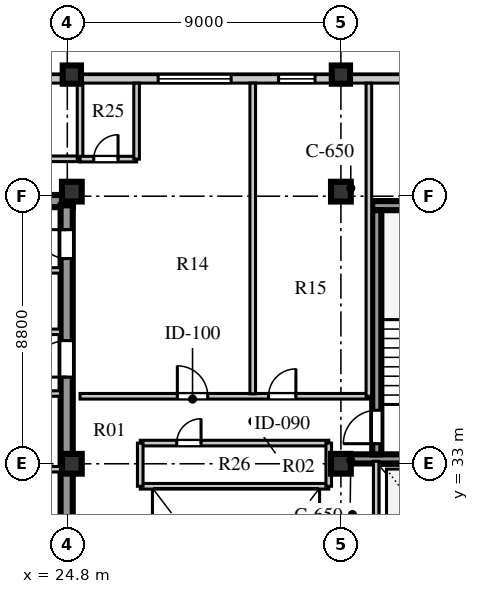
"""IFC4 building model, lengths in metres.
Left out: names, types, materials, properties, quantities, classifications, styles, units other than length and angle.
Written with IfcOpenShell. Run it as: python <this file> out.ifc"""

import sys

from ifc_helpers import new_model, si_unit, direction, frame, frame_2d, origin, origin_2d, place, context, subcontext, project, spatial, rectangle, extrude, element, fill, save


model = new_model("IFC4")
c1 = context("Model", 3, precision=1e-05, world=origin(), true_north=direction((0.0, 1.0)))
c2 = subcontext(c1, "Body", "Model", "MODEL_VIEW")
j1 = project(units=[si_unit("LENGTHUNIT", "METRE"), si_unit("PLANEANGLEUNIT", "RADIAN")], contexts=[c1])
p1 = place(None, origin())
s1 = spatial("IfcSite", under=j1, at=p1, CompositionType="ELEMENT")
p2 = place(p1, origin())
s2 = spatial("IfcBuilding", under=s1, at=p2, CompositionType="ELEMENT")
p3 = place(p2, frame((0.0, 0.0, 335.3)))
s3 = spatial("IfcBuildingStorey", under=s2, at=p3, CompositionType="ELEMENT", Elevation=335.3)
p4 = place(p3, frame((15.5, 41.64, 0.0), z_axis=(0.0, 0.0, 1.0), x_axis=(1.0, 0.0, 0.0)))
e1 = element("IfcWall", 1, at=p4, inside=s3, PredefinedType="SHEAR", context=c2, shape_type="SweptSolid", body=[
    extrude(rectangle(XDim=9.48, YDim=0.4, at=frame_2d((4.74, 0.0))), origin(), (0.0, 0.0, 1.0), 3.56),
])
p5 = place(p3, frame((24.78, 15.74, 0.0), z_axis=(0.0, 0.0, 1.0), x_axis=(0.0, 1.0, 0.0)))
e2 = element("IfcWall", 2, at=p5, inside=s3, PredefinedType="SHEAR", context=c2, shape_type="SweptSolid", body=[
    extrude(rectangle(XDim=25.76, YDim=0.4, at=frame_2d((12.88, 0.0))), origin(), (0.0, 0.0, 1.0), 3.56),
])
p6 = place(p5, frame((1.61, 0.0, 0.0)))
e3 = element("IfcOpeningElement", 3, at=p6, cuts=e2, PredefinedType="OPENING", context=c2, shape_type="SweptSolid", body=[
    extrude(rectangle(XDim=1.2, YDim=2.1, at=frame_2d((0.6, 1.05))), frame((0.0, 0.21, 0.0), z_axis=(0.0, -1.0, 0.0), x_axis=(1.0, 0.0, 0.0)), (0.0, 0.0, 1.0), 0.42),
])
p7 = place(p5, frame((6.78, 0.0, 0.0)))
e4 = element("IfcOpeningElement", 4, at=p7, cuts=e2, PredefinedType="OPENING", context=c2, shape_type="SweptSolid", body=[
    extrude(rectangle(XDim=0.85, YDim=2.06, at=frame_2d((0.425, 1.03))), frame((0.0, 0.21, 0.0), z_axis=(0.0, -1.0, 0.0), x_axis=(1.0, 0.0, 0.0)), (0.0, 0.0, 1.0), 0.42),
])
p8 = place(p5, frame((12.11, 0.0, 0.0)))
e5 = element("IfcOpeningElement", 5, at=p8, cuts=e2, PredefinedType="OPENING", context=c2, shape_type="SweptSolid", body=[
    extrude(rectangle(XDim=1.5, YDim=2.12, at=frame_2d((0.75, 1.06))), frame((0.0, 0.21, 0.0), z_axis=(0.0, -1.0, 0.0), x_axis=(1.0, 0.0, 0.0)), (0.0, 0.0, 1.0), 0.42),
])
p9 = place(p5, frame((20.11, 0.0, 0.0)))
e6 = element("IfcOpeningElement", 6, at=p9, cuts=e2, PredefinedType="OPENING", context=c2, shape_type="SweptSolid", body=[
    extrude(rectangle(XDim=1.2, YDim=2.12, at=frame_2d((0.6, 1.06))), frame((0.0, 0.21, 0.0), z_axis=(0.0, -1.0, 0.0), x_axis=(1.0, 0.0, 0.0)), (0.0, 0.0, 1.0), 0.42),
])
p10 = place(p5, frame((24.01, 0.0, 0.0)))
e7 = element("IfcOpeningElement", 7, at=p10, cuts=e2, PredefinedType="OPENING", context=c2, shape_type="SweptSolid", body=[
    extrude(rectangle(XDim=0.95, YDim=2.1, at=frame_2d((0.475, 1.05))), frame((0.0, 0.21, 0.0), z_axis=(0.0, -1.0, 0.0), x_axis=(1.0, 0.0, 0.0)), (0.0, 0.0, 1.0), 0.42),
])
p11 = place(p3, frame((34.125, 33.16, 0.0), z_axis=(0.0, 0.0, 1.0), x_axis=(1.0, 0.0, 0.0)))
e8 = element("IfcWall", 8, at=p11, inside=s3, PredefinedType="SHEAR", context=c2, shape_type="SweptSolid", body=[
    extrude(rectangle(XDim=4.745, YDim=0.3, at=frame_2d((2.373, 0.0))), origin(), (0.0, 0.0, 1.0), 3.56),
])
p12 = place(p3, frame((34.83, 41.49, 0.0), z_axis=(0.0, 0.0, 1.0), x_axis=(1.0, 0.0, 0.0)))
e9 = element("IfcWall", 9, at=p12, inside=s3, PredefinedType="SHEAR", context=c2, shape_type="SweptSolid", body=[
    extrude(rectangle(XDim=4.04, YDim=0.3, at=frame_2d((2.02, 0.0))), origin(), (0.0, 0.0, 1.0), 3.56),
])
p13 = place(p3, frame((34.98, 33.31, 0.0), z_axis=(0.0, 0.0, 1.0), x_axis=(0.0, 1.0, 0.0)))
e10 = element("IfcWall", 10, at=p13, inside=s3, PredefinedType="SHEAR", context=c2, shape_type="SweptSolid", body=[
    extrude(rectangle(XDim=8.03, YDim=0.3, at=frame_2d((4.015, 0.0))), origin(), (0.0, 0.0, 1.0), 3.56),
])
p14 = place(p13, frame((0.35, 0.0, 0.0)))
e11 = element("IfcOpeningElement", 11, at=p14, cuts=e10, PredefinedType="OPENING", context=c2, shape_type="SweptSolid", body=[
    extrude(rectangle(XDim=1.1, YDim=2.1, at=frame_2d((0.55, 1.05))), frame((0.0, 0.16, 0.0), z_axis=(0.0, -1.0, 0.0), x_axis=(1.0, 0.0, 0.0)), (0.0, 0.0, 1.0), 0.32),
])
for number, where, z_axis, x_axis in (
    (12, (24.95, 33.0, 0.0), (0.0, 0.0, 1.0), (1.0, 0.0, 0.0)),
    (13, (24.95, 41.95, 0.0), (0.0, 0.0, 1.0), (1.0, 0.0, 0.0)),
    (14, (33.8, 33.0, 0.0), (0.0, 0.0, 1.0), (1.0, 0.0, 0.0)),
    (15, (33.8, 41.95, 0.0), (0.0, 0.0, 1.0), (1.0, 0.0, 0.0)),
):
    element("IfcColumn", number, at=place(p3, frame(where, z_axis=z_axis, x_axis=x_axis)), inside=s3, PredefinedType="COLUMN", context=c2, shape_type="SweptSolid", body=[
        extrude(rectangle(XDim=0.65, YDim=0.65, at=origin_2d()), origin(), (0.0, 0.0, 1.0), 3.56),
    ])
for number, where, z_axis, x_axis in (
    (16, (24.95, 45.8, 0.0), (0.0, 0.0, 1.0), (1.0, 0.0, 0.0)),
    (17, (33.8, 45.8, 0.0), (0.0, 0.0, 1.0), (1.0, 0.0, 0.0)),
):
    element("IfcColumn", number, at=place(p3, frame(where, z_axis=z_axis, x_axis=x_axis)), inside=s3, PredefinedType="COLUMN", context=c2, shape_type="SweptSolid", body=[
        extrude(rectangle(XDim=0.6, YDim=0.6, at=origin_2d()), origin(), (0.0, 0.0, 1.0), 3.56),
    ])
p15 = place(p3, frame((39.8, 45.66, 0.0), z_axis=(0.0, 0.0, 1.0), x_axis=(-1.0, 0.0, 0.0)))
e18 = element("IfcWall", 18, at=p15, inside=s3, PredefinedType="STANDARD", context=c2, shape_type="SweptSolid", body=[
    extrude(rectangle(XDim=26.0, YDim=0.28, at=frame_2d((13.0, 0.0))), origin(), (0.0, 0.0, 1.0), 2.92),
])
p16 = place(p15, frame((19.0, 0.0, 0.8)))
e19 = element("IfcOpeningElement", 19, at=p16, cuts=e18, PredefinedType="OPENING", context=c2, shape_type="SweptSolid", body=[
    extrude(rectangle(XDim=1.2, YDim=1.75, at=frame_2d((0.6, 0.875))), frame((0.0, 0.15, 0.0), z_axis=(0.0, -1.0, 0.0), x_axis=(1.0, 0.0, 0.0)), (0.0, 0.0, 1.0), 0.3),
])
p17 = place(p15, frame((9.61, 0.0, 0.8)))
e20 = element("IfcOpeningElement", 20, at=p17, cuts=e18, PredefinedType="OPENING", context=c2, shape_type="SweptSolid", body=[
    extrude(rectangle(XDim=2.4, YDim=2.05, at=frame_2d((1.2, 1.025))), frame((0.0, 0.15, 0.0), z_axis=(0.0, -1.0, 0.0), x_axis=(1.0, 0.0, 0.0)), (0.0, 0.0, 1.0), 0.3),
])
p18 = place(p15, frame((6.85, 0.0, 0.8)))
e21 = element("IfcOpeningElement", 21, at=p18, cuts=e18, PredefinedType="OPENING", context=c2, shape_type="SweptSolid", body=[
    extrude(rectangle(XDim=1.2, YDim=1.75, at=frame_2d((0.6, 0.875))), frame((0.0, 0.15, 0.0), z_axis=(0.0, -1.0, 0.0), x_axis=(1.0, 0.0, 0.0)), (0.0, 0.0, 1.0), 0.3),
])
p19 = place(p15, frame((1.8, 0.0, 0.8)))
e22 = element("IfcOpeningElement", 22, at=p19, cuts=e18, PredefinedType="OPENING", context=c2, shape_type="SweptSolid", body=[
    extrude(rectangle(XDim=1.35, YDim=1.9, at=frame_2d((0.675, 0.95))), frame((0.0, 0.15, 0.0), z_axis=(0.0, -1.0, 0.0), x_axis=(1.0, 0.0, 0.0)), (0.0, 0.0, 1.0), 0.3),
])
p20 = place(p3, frame((15.9, 32.82, 0.0), z_axis=(0.0, 0.0, 1.0), x_axis=(1.0, 0.0, 0.0)))
e23 = element("IfcWall", 23, at=p20, inside=s3, PredefinedType="SOLIDWALL", context=c2, shape_type="SweptSolid", body=[
    extrude(rectangle(XDim=8.68, YDim=0.18, at=frame_2d((4.34, 0.0))), origin(), (0.0, 0.0, 1.0), 2.96),
])
p21 = place(p3, frame((22.02, 35.31, 0.0), z_axis=(0.0, 0.0, 1.0), x_axis=(1.0, 0.0, 0.0)))
e24 = element("IfcWall", 24, at=p21, inside=s3, PredefinedType="SOLIDWALL", context=c2, shape_type="SweptSolid", body=[
    extrude(rectangle(XDim=2.56, YDim=0.18, at=frame_2d((1.28, 0.0))), origin(), (0.0, 0.0, 1.0), 3.56),
])
p22 = place(p21, frame((0.55, 0.0, 0.0)))
e25 = element("IfcOpeningElement", 25, at=p22, cuts=e24, PredefinedType="OPENING", context=c2, shape_type="SweptSolid", body=[
    extrude(rectangle(XDim=1.0, YDim=2.1, at=frame_2d((0.5, 1.05))), frame((0.0, 0.1, 0.0), z_axis=(0.0, -1.0, 0.0), x_axis=(1.0, 0.0, 0.0)), (0.0, 0.0, 1.0), 0.2),
])
p23 = place(p3, frame((19.64, 37.34, 0.0), z_axis=(0.0, 0.0, 1.0), x_axis=(1.0, 0.0, 0.0)))
e26 = element("IfcWall", 26, at=p23, inside=s3, PredefinedType="SOLIDWALL", context=c2, shape_type="SweptSolid", body=[
    extrude(rectangle(XDim=4.94, YDim=0.18, at=frame_2d((2.47, 0.0))), origin(), (0.0, 0.0, 1.0), 3.56),
])
p24 = place(p23, frame((0.45, 0.0, 0.0)))
e27 = element("IfcOpeningElement", 27, at=p24, cuts=e26, PredefinedType="OPENING", context=c2, shape_type="SweptSolid", body=[
    extrude(rectangle(XDim=1.0, YDim=2.1, at=frame_2d((0.5, 1.05))), frame((0.0, 0.1, 0.0), z_axis=(0.0, -1.0, 0.0), x_axis=(1.0, 0.0, 0.0)), (0.0, 0.0, 1.0), 0.2),
])
p25 = place(p23, frame((2.5, 0.0, 0.0)))
e28 = element("IfcOpeningElement", 28, at=p25, cuts=e26, PredefinedType="OPENING", context=c2, shape_type="SweptSolid", body=[
    extrude(rectangle(XDim=1.0, YDim=2.1, at=frame_2d((0.5, 1.05))), frame((0.0, 0.1, 0.0), z_axis=(0.0, -1.0, 0.0), x_axis=(1.0, 0.0, 0.0)), (0.0, 0.0, 1.0), 0.2),
])
p26 = place(p3, frame((19.64, 39.36, 0.0), z_axis=(0.0, 0.0, 1.0), x_axis=(1.0, 0.0, 0.0)))
e29 = element("IfcWall", 29, at=p26, inside=s3, PredefinedType="SOLIDWALL", context=c2, shape_type="SweptSolid", body=[
    extrude(rectangle(XDim=4.94, YDim=0.18, at=frame_2d((2.47, 0.0))), origin(), (0.0, 0.0, 1.0), 3.56),
])
p27 = place(p3, frame((34.96, 28.86, 0.0), z_axis=(0.0, 0.0, 1.0), x_axis=(0.0, 1.0, 0.0)))
e30 = element("IfcWall", 30, at=p27, inside=s3, PredefinedType="SOLIDWALL", context=c2, shape_type="SweptSolid", body=[
    extrude(rectangle(XDim=4.22, YDim=0.18, at=frame_2d((2.11, 0.0))), origin(), (0.0, 0.0, 1.0), 3.56),
])
p28 = place(p3, frame((25.22, 35.22, 0.0), z_axis=(0.0, 0.0, 1.0), x_axis=(1.0, 0.0, 0.0)))
e31 = element("IfcWall", 31, at=p28, inside=s3, PredefinedType="SOLIDWALL", context=c2, shape_type="SweptSolid", body=[
    extrude(rectangle(XDim=9.5, YDim=0.185, at=frame_2d((4.75, 0.0))), origin(), (0.0, 0.0, 1.0), 3.56),
])
p29 = place(p28, frame((3.2, 0.0, 0.0)))
e32 = element("IfcOpeningElement", 32, at=p29, cuts=e31, PredefinedType="OPENING", context=c2, shape_type="SweptSolid", body=[
    extrude(rectangle(XDim=1.0, YDim=2.08, at=frame_2d((0.5, 1.04))), frame((0.0, 0.103, 0.0), z_axis=(0.0, -1.0, 0.0), x_axis=(1.0, 0.0, 0.0)), (0.0, 0.0, 1.0), 0.205),
])
p30 = place(p28, frame((6.2, 0.0, 0.0)))
e33 = element("IfcOpeningElement", 33, at=p30, cuts=e31, PredefinedType="OPENING", context=c2, shape_type="SweptSolid", body=[
    extrude(rectangle(XDim=0.9, YDim=2.08, at=frame_2d((0.45, 1.04))), frame((0.0, 0.103, 0.0), z_axis=(0.0, -1.0, 0.0), x_axis=(1.0, 0.0, 0.0)), (0.0, 0.0, 1.0), 0.205),
])
p31 = place(p3, frame((14.15, 43.03, 0.0), z_axis=(0.0, 0.0, 1.0), x_axis=(1.0, 0.0, 0.0)))
e34 = element("IfcWall", 34, at=p31, inside=s3, PredefinedType="SOLIDWALL", context=c2, shape_type="SweptSolid", body=[
    extrude(rectangle(XDim=11.07, YDim=0.185, at=frame_2d((5.535, 0.0))), origin(), (0.0, 0.0, 1.0), 3.56),
])
p32 = place(p31, frame((3.2, 0.0, 0.0)))
e35 = element("IfcOpeningElement", 35, at=p32, cuts=e34, PredefinedType="OPENING", context=c2, shape_type="SweptSolid", body=[
    extrude(rectangle(XDim=0.95, YDim=2.08, at=frame_2d((0.475, 1.04))), frame((0.0, 0.103, 0.0), z_axis=(0.0, -1.0, 0.0), x_axis=(1.0, 0.0, 0.0)), (0.0, 0.0, 1.0), 0.205),
])
p33 = place(p3, frame((25.22, 43.03, 0.0), z_axis=(0.0, 0.0, 1.0), x_axis=(0.0, 1.0, 0.0)))
e36 = element("IfcWall", 36, at=p33, inside=s3, PredefinedType="SOLIDWALL", context=c2, shape_type="SweptSolid", body=[
    extrude(rectangle(XDim=2.49, YDim=0.185, at=frame_2d((1.245, 0.0))), origin(), (0.0, 0.0, 1.0), 3.11),
])
p34 = place(p3, frame((34.72, 35.22, 0.0), z_axis=(0.0, 0.0, 1.0), x_axis=(0.0, 1.0, 0.0)))
e37 = element("IfcWall", 37, at=p34, inside=s3, PredefinedType="SOLIDWALL", context=c2, shape_type="SweptSolid", body=[
    extrude(rectangle(XDim=10.3, YDim=0.185, at=frame_2d((5.15, 0.0))), origin(), (0.0, 0.0, 1.0), 3.56),
])
p35 = place(p3, frame((30.9, 35.3, 0.0), z_axis=(0.0, 0.0, 1.0), x_axis=(0.0, 1.0, 0.0)))
e38 = element("IfcWall", 38, at=p35, inside=s3, PredefinedType="SOLIDWALL", context=c2, shape_type="SweptSolid", body=[
    extrude(rectangle(XDim=10.22, YDim=0.185, at=frame_2d((5.11, 0.0))), origin(), (0.0, 0.0, 1.0), 3.56),
])
p36 = place(p3, frame((25.22, 43.02, 0.0), z_axis=(0.0, 0.0, 1.0), x_axis=(1.0, 0.0, 0.0)))
e39 = element("IfcWall", 39, at=p36, inside=s3, PredefinedType="SOLIDWALL", context=c2, shape_type="SweptSolid", body=[
    extrude(rectangle(XDim=1.86, YDim=0.185, at=frame_2d((0.93, 0.0))), origin(), (0.0, 0.0, 1.0), 3.56),
])
p37 = place(p36, frame((0.45, 0.0, 0.0)))
e40 = element("IfcOpeningElement", 40, at=p37, cuts=e39, PredefinedType="OPENING", context=c2, shape_type="SweptSolid", body=[
    extrude(rectangle(XDim=0.8, YDim=2.05, at=frame_2d((0.4, 1.025))), frame((0.0, 0.103, 0.0), z_axis=(0.0, -1.0, 0.0), x_axis=(1.0, 0.0, 0.0)), (0.0, 0.0, 1.0), 0.205),
])
p38 = place(p3, frame((27.08, 43.02, 0.0), z_axis=(0.0, 0.0, 1.0), x_axis=(0.0, 1.0, 0.0)))
e41 = element("IfcWall", 41, at=p38, inside=s3, PredefinedType="SOLIDWALL", context=c2, shape_type="SweptSolid", body=[
    extrude(rectangle(XDim=2.5, YDim=0.185, at=frame_2d((1.25, 0.0))), origin(), (0.0, 0.0, 1.0), 3.56),
])
p39 = place(p3, frame((27.2, 33.68, 0.0), z_axis=(0.0, 0.0, 1.0), x_axis=(1.0, 0.0, 0.0)))
e42 = element("IfcWall", 42, at=p39, inside=s3, PredefinedType="SOLIDWALL", context=c2, shape_type="SweptSolid", body=[
    extrude(rectangle(XDim=6.2, YDim=0.185, at=frame_2d((3.1, 0.0))), origin(), (0.0, 0.0, 1.0), 3.56),
])
p40 = place(p39, frame((1.2, 0.0, 0.0)))
e43 = element("IfcOpeningElement", 43, at=p40, cuts=e42, PredefinedType="OPENING", context=c2, shape_type="SweptSolid", body=[
    extrude(rectangle(XDim=0.8, YDim=2.05, at=frame_2d((0.4, 1.025))), frame((0.0, 0.103, 0.0), z_axis=(0.0, -1.0, 0.0), x_axis=(1.0, 0.0, 0.0)), (0.0, 0.0, 1.0), 0.205),
])
p41 = place(p3, frame((27.2, 32.26, 0.0), z_axis=(0.0, 0.0, 1.0), x_axis=(1.0, 0.0, 0.0)))
e44 = element("IfcWall", 44, at=p41, inside=s3, PredefinedType="SOLIDWALL", context=c2, shape_type="SweptSolid", body=[
    extrude(rectangle(XDim=6.2, YDim=0.185, at=frame_2d((3.1, 0.0))), origin(), (0.0, 0.0, 1.0), 3.01),
])
p42 = place(p3, frame((27.2, 32.26, 0.0), z_axis=(0.0, 0.0, 1.0), x_axis=(0.0, 1.0, 0.0)))
e45 = element("IfcWall", 45, at=p42, inside=s3, PredefinedType="SOLIDWALL", context=c2, shape_type="SweptSolid", body=[
    extrude(rectangle(XDim=1.42, YDim=0.185, at=frame_2d((0.71, 0.0))), origin(), (0.0, 0.0, 1.0), 3.56),
])
p43 = place(p3, frame((33.4, 32.26, 0.0), z_axis=(0.0, 0.0, 1.0), x_axis=(0.0, 1.0, 0.0)))
e46 = element("IfcWall", 46, at=p43, inside=s3, PredefinedType="SOLIDWALL", context=c2, shape_type="SweptSolid", body=[
    extrude(rectangle(XDim=1.42, YDim=0.185, at=frame_2d((0.71, 0.0))), origin(), (0.0, 0.0, 1.0), 3.01),
])
p44 = place(p17, origin())
e47 = element("IfcWindow", 47, at=p44, inside=s3, PartitioningType="SINGLE_PANEL", PredefinedType="WINDOW", context=c2, shape_type="SweptSolid", body=[
    extrude(rectangle(XDim=2.4, YDim=2.05, at=frame_2d((1.2, 1.025))), frame((0.0, 0.03, 0.0), z_axis=(0.0, -1.0, 0.0), x_axis=(1.0, 0.0, 0.0)), (0.0, 0.0, 1.0), 0.06),
])
fill(e20, e47)
p45 = place(p18, origin())
e48 = element("IfcWindow", 48, at=p45, inside=s3, PartitioningType="SINGLE_PANEL", PredefinedType="WINDOW", context=c2, shape_type="SweptSolid", body=[
    extrude(rectangle(XDim=1.2, YDim=1.75, at=frame_2d((0.6, 0.875))), frame((0.0, 0.03, 0.0), z_axis=(0.0, -1.0, 0.0), x_axis=(1.0, 0.0, 0.0)), (0.0, 0.0, 1.0), 0.06),
])
fill(e21, e48)
p46 = place(p9, frame((1.2, 0.0, 0.0), z_axis=(0.0, 0.0, 1.0), x_axis=(-1.0, 0.0, 0.0)))
e49 = element("IfcDoor", 49, at=p46, inside=s3, OperationType="SINGLE_SWING_RIGHT", PredefinedType="DOOR", context=c2, shape_type="SweptSolid", body=[
    extrude(rectangle(XDim=1.2, YDim=2.12, at=frame_2d((0.6, 1.06))), frame((0.0, 0.025, 0.0), z_axis=(0.0, -1.0, 0.0), x_axis=(1.0, 0.0, 0.0)), (0.0, 0.0, 1.0), 0.05),
])
fill(e6, e49)
p47 = place(p10, frame((0.95, 0.0, 0.0), z_axis=(0.0, 0.0, 1.0), x_axis=(-1.0, 0.0, 0.0)))
e50 = element("IfcDoor", 50, at=p47, inside=s3, OperationType="SINGLE_SWING_LEFT", PredefinedType="DOOR", context=c2, shape_type="SweptSolid", body=[
    extrude(rectangle(XDim=0.95, YDim=2.1, at=frame_2d((0.475, 1.05))), frame((0.0, 0.025, 0.0), z_axis=(0.0, -1.0, 0.0), x_axis=(1.0, 0.0, 0.0)), (0.0, 0.0, 1.0), 0.05),
])
fill(e7, e50)
p48 = place(p14, origin())
e51 = element("IfcDoor", 51, at=p48, inside=s3, OperationType="SINGLE_SWING_LEFT", PredefinedType="DOOR", context=c2, shape_type="SweptSolid", body=[
    extrude(rectangle(XDim=1.1, YDim=2.1, at=frame_2d((0.55, 1.05))), frame((0.0, 0.025, 0.0), z_axis=(0.0, -1.0, 0.0), x_axis=(1.0, 0.0, 0.0)), (0.0, 0.0, 1.0), 0.05),
])
fill(e11, e51)
p49 = place(p29, origin())
e52 = element("IfcDoor", 52, at=p49, inside=s3, OperationType="SINGLE_SWING_LEFT", PredefinedType="DOOR", context=c2, shape_type="SweptSolid", body=[
    extrude(rectangle(XDim=1.0, YDim=2.08, at=frame_2d((0.5, 1.04))), frame((0.0, 0.025, 0.0), z_axis=(0.0, -1.0, 0.0), x_axis=(1.0, 0.0, 0.0)), (0.0, 0.0, 1.0), 0.05),
])
fill(e32, e52)
p50 = place(p30, origin())
e53 = element("IfcDoor", 53, at=p50, inside=s3, OperationType="SINGLE_SWING_RIGHT", PredefinedType="DOOR", context=c2, shape_type="SweptSolid", body=[
    extrude(rectangle(XDim=0.9, YDim=2.08, at=frame_2d((0.45, 1.04))), frame((0.0, 0.025, 0.0), z_axis=(0.0, -1.0, 0.0), x_axis=(1.0, 0.0, 0.0)), (0.0, 0.0, 1.0), 0.05),
])
fill(e33, e53)
p51 = place(p37, frame((0.8, 0.0, 0.0), z_axis=(0.0, 0.0, 1.0), x_axis=(-1.0, 0.0, 0.0)))
e54 = element("IfcDoor", 54, at=p51, inside=s3, OperationType="SINGLE_SWING_LEFT", PredefinedType="DOOR", context=c2, shape_type="SweptSolid", body=[
    extrude(rectangle(XDim=0.8, YDim=2.05, at=frame_2d((0.4, 1.025))), frame((0.0, 0.025, 0.0), z_axis=(0.0, -1.0, 0.0), x_axis=(1.0, 0.0, 0.0)), (0.0, 0.0, 1.0), 0.05),
])
fill(e40, e54)
p52 = place(p40, frame((0.8, 0.0, 0.0), z_axis=(0.0, 0.0, 1.0), x_axis=(-1.0, 0.0, 0.0)))
e55 = element("IfcDoor", 55, at=p52, inside=s3, OperationType="SINGLE_SWING_LEFT", PredefinedType="DOOR", context=c2, shape_type="SweptSolid", body=[
    extrude(rectangle(XDim=0.8, YDim=2.05, at=frame_2d((0.4, 1.025))), frame((0.0, 0.025, 0.0), z_axis=(0.0, -1.0, 0.0), x_axis=(1.0, 0.0, 0.0)), (0.0, 0.0, 1.0), 0.05),
])
fill(e43, e55)
save(model, sys.argv[1])
